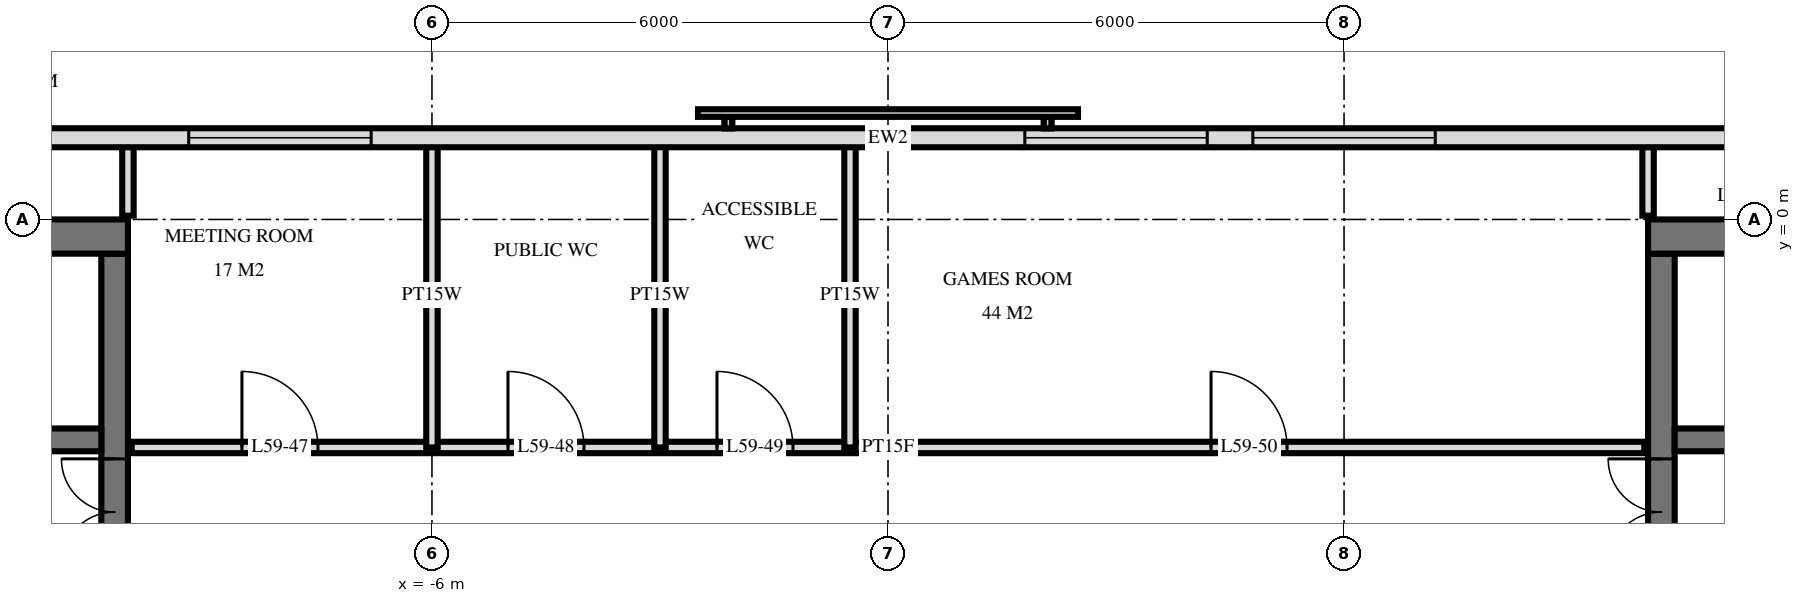
"""IFC4 building model, lengths in metres.
Left out: names, types, materials, properties, quantities, classifications, styles, units other than length and angle.
Written with IfcOpenShell. Run it as: python <this file> out.ifc"""

import sys

from ifc_helpers import new_model, si_unit, direction, frame, frame_2d, origin, place, context, subcontext, project, spatial, rectangle, extrude, element, fill, save


model = new_model("IFC4")
c1 = context("Model", 3, precision=1e-05, world=origin(), true_north=direction((0.0, 1.0)))
c2 = subcontext(c1, "Body", "Model", "MODEL_VIEW")
j1 = project(units=[si_unit("LENGTHUNIT", "METRE"), si_unit("PLANEANGLEUNIT", "RADIAN")], contexts=[c1])
p1 = place(None, origin())
s1 = spatial("IfcSite", under=j1, at=p1, CompositionType="ELEMENT")
p2 = place(p1, origin())
s2 = spatial("IfcBuilding", under=s1, at=p2, CompositionType="ELEMENT")
p3 = place(p2, frame((0.0, 0.0, 225.6)))
s3 = spatial("IfcBuildingStorey", under=s2, at=p3, CompositionType="ELEMENT", Elevation=225.6)
p4 = place(p3, frame((-24.5, -0.225, 0.0), z_axis=(0.0, 0.0, 1.0), x_axis=(1.0, 0.0, 0.0)))
e1 = element("IfcWall", 1, at=p4, inside=s3, PredefinedType="SHEAR", context=c2, shape_type="SweptSolid", body=[
    extrude(rectangle(XDim=14.5, YDim=0.45, at=frame_2d((7.25, 0.0))), origin(), (0.0, 0.0, 1.0), 3.5),
])
p5 = place(p3, frame((-10.175, -14.55, 0.0), z_axis=(0.0, 0.0, 1.0), x_axis=(0.0, 1.0, 0.0)))
e2 = element("IfcWall", 2, at=p5, inside=s3, PredefinedType="SHEAR", context=c2, shape_type="SweptSolid", body=[
    extrude(rectangle(XDim=14.1, YDim=0.35, at=frame_2d((7.05, 0.0))), origin(), (0.0, 0.0, 1.0), 3.5),
])
p6 = place(p5, frame((8.4, 0.0, 0.0)))
e3 = element("IfcOpeningElement", 3, at=p6, cuts=e2, PredefinedType="OPENING", context=c2, shape_type="SweptSolid", body=[
    extrude(rectangle(XDim=1.4, YDim=2.4, at=frame_2d((0.7, 1.2))), frame((0.0, 0.185, 0.0), z_axis=(0.0, -1.0, 0.0), x_axis=(1.0, 0.0, 0.0)), (0.0, 0.0, 1.0), 0.37),
])
p7 = place(p5, frame((10.0, 0.0, 0.0)))
e4 = element("IfcOpeningElement", 4, at=p7, cuts=e2, PredefinedType="OPENING", context=c2, shape_type="SweptSolid", body=[
    extrude(rectangle(XDim=1.4, YDim=2.4, at=frame_2d((0.7, 1.2))), frame((0.0, 0.185, 0.0), z_axis=(0.0, -1.0, 0.0), x_axis=(1.0, 0.0, 0.0)), (0.0, 0.0, 1.0), 0.37),
])
p8 = place(p5, frame((4.0, 0.0, 0.0)))
e5 = element("IfcOpeningElement", 5, at=p8, cuts=e2, PredefinedType="OPENING", context=c2, shape_type="SweptSolid", body=[
    extrude(rectangle(XDim=1.2, YDim=2.1, at=frame_2d((0.6, 1.05))), frame((0.0, 0.185, 0.0), z_axis=(0.0, -1.0, 0.0), x_axis=(1.0, 0.0, 0.0)), (0.0, 0.0, 1.0), 0.37),
])
p9 = place(p3, frame((-24.05, -2.9, 0.0), z_axis=(0.0, 0.0, 1.0), x_axis=(1.0, 0.0, 0.0)))
e6 = element("IfcWall", 6, at=p9, inside=s3, PredefinedType="SHEAR", context=c2, shape_type="SweptSolid", body=[
    extrude(rectangle(XDim=13.7, YDim=0.3, at=frame_2d((6.85, 0.0))), origin(), (0.0, 0.0, 1.0), 3.5),
])
p10 = place(p9, frame((0.55, 0.0, 0.0)))
e7 = element("IfcOpeningElement", 7, at=p10, cuts=e6, PredefinedType="OPENING", context=c2, shape_type="SweptSolid", body=[
    extrude(rectangle(XDim=1.1, YDim=2.1, at=frame_2d((0.55, 1.05))), frame((0.0, 0.16, 0.0), z_axis=(0.0, -1.0, 0.0), x_axis=(1.0, 0.0, 0.0)), (0.0, 0.0, 1.0), 0.32),
])
p11 = place(p9, frame((5.9, 0.0, 0.0)))
e8 = element("IfcOpeningElement", 8, at=p11, cuts=e6, PredefinedType="OPENING", context=c2, shape_type="SweptSolid", body=[
    extrude(rectangle(XDim=0.9, YDim=2.1, at=frame_2d((0.45, 1.05))), frame((0.0, 0.16, 0.0), z_axis=(0.0, -1.0, 0.0), x_axis=(1.0, 0.0, 0.0)), (0.0, 0.0, 1.0), 0.32),
])
p12 = place(p9, frame((11.85, 0.0, 0.0)))
e9 = element("IfcOpeningElement", 9, at=p12, cuts=e6, PredefinedType="OPENING", context=c2, shape_type="SweptSolid", body=[
    extrude(rectangle(XDim=1.0, YDim=2.1, at=frame_2d((0.5, 1.05))), frame((0.0, 0.16, 0.0), z_axis=(0.0, -1.0, 0.0), x_axis=(1.0, 0.0, 0.0)), (0.0, 0.0, 1.0), 0.32),
])
p13 = place(p9, frame((9.312, 0.0, 0.0)))
e10 = element("IfcOpeningElement", 10, at=p13, cuts=e6, PredefinedType="OPENING", context=c2, shape_type="SweptSolid", body=[
    extrude(rectangle(XDim=1.0, YDim=2.1, at=frame_2d((0.5, 1.05))), frame((0.0, 0.16, 0.0), z_axis=(0.0, -1.0, 0.0), x_axis=(1.0, 0.0, 0.0)), (0.0, 0.0, 1.0), 0.32),
])
p14 = place(p9, frame((7.887, 0.0, 0.0)))
e11 = element("IfcOpeningElement", 11, at=p14, cuts=e6, PredefinedType="OPENING", context=c2, shape_type="SweptSolid", body=[
    extrude(rectangle(XDim=1.0, YDim=2.1, at=frame_2d((0.5, 1.05))), frame((0.0, 0.16, 0.0), z_axis=(0.0, -1.0, 0.0), x_axis=(1.0, 0.0, 0.0)), (0.0, 0.0, 1.0), 0.32),
])
p15 = place(p9, frame((3.0, 0.0, 0.0)))
e12 = element("IfcOpeningElement", 12, at=p15, cuts=e6, PredefinedType="OPENING", context=c2, shape_type="SweptSolid", body=[
    extrude(rectangle(XDim=1.0, YDim=2.1, at=frame_2d((0.5, 1.05))), frame((0.0, 0.16, 0.0), z_axis=(0.0, -1.0, 0.0), x_axis=(1.0, 0.0, 0.0)), (0.0, 0.0, 1.0), 0.32),
])
p16 = place(p3, frame((10.0, -0.225, 0.0), z_axis=(0.0, 0.0, 1.0), x_axis=(1.0, 0.0, 0.0)))
e13 = element("IfcWall", 13, at=p16, inside=s3, PredefinedType="SHEAR", context=c2, shape_type="SweptSolid", body=[
    extrude(rectangle(XDim=14.5, YDim=0.45, at=frame_2d((7.25, 0.0))), origin(), (0.0, 0.0, 1.0), 3.5),
])
p17 = place(p3, frame((10.175, -14.55, 0.0), z_axis=(0.0, 0.0, 1.0), x_axis=(0.0, 1.0, 0.0)))
e14 = element("IfcWall", 14, at=p17, inside=s3, PredefinedType="SHEAR", context=c2, shape_type="SweptSolid", body=[
    extrude(rectangle(XDim=14.1, YDim=0.35, at=frame_2d((7.05, 0.0))), origin(), (0.0, 0.0, 1.0), 3.5),
])
p18 = place(p17, frame((8.4, 0.0, 0.0)))
e15 = element("IfcOpeningElement", 15, at=p18, cuts=e14, PredefinedType="OPENING", context=c2, shape_type="SweptSolid", body=[
    extrude(rectangle(XDim=1.4, YDim=2.4, at=frame_2d((0.7, 1.2))), frame((0.0, 0.185, 0.0), z_axis=(0.0, -1.0, 0.0), x_axis=(1.0, 0.0, 0.0)), (0.0, 0.0, 1.0), 0.37),
])
p19 = place(p17, frame((10.0, 0.0, 0.0)))
e16 = element("IfcOpeningElement", 16, at=p19, cuts=e14, PredefinedType="OPENING", context=c2, shape_type="SweptSolid", body=[
    extrude(rectangle(XDim=1.4, YDim=2.4, at=frame_2d((0.7, 1.2))), frame((0.0, 0.185, 0.0), z_axis=(0.0, -1.0, 0.0), x_axis=(1.0, 0.0, 0.0)), (0.0, 0.0, 1.0), 0.37),
])
p20 = place(p17, frame((4.0, 0.0, 0.0)))
e17 = element("IfcOpeningElement", 17, at=p20, cuts=e14, PredefinedType="OPENING", context=c2, shape_type="SweptSolid", body=[
    extrude(rectangle(XDim=1.2, YDim=2.1, at=frame_2d((0.6, 1.05))), frame((0.0, 0.185, 0.0), z_axis=(0.0, -1.0, 0.0), x_axis=(1.0, 0.0, 0.0)), (0.0, 0.0, 1.0), 0.37),
])
p21 = place(p3, frame((10.35, -2.9, 0.0), z_axis=(0.0, 0.0, 1.0), x_axis=(1.0, 0.0, 0.0)))
e18 = element("IfcWall", 18, at=p21, inside=s3, PredefinedType="SHEAR", context=c2, shape_type="SweptSolid", body=[
    extrude(rectangle(XDim=13.7, YDim=0.3, at=frame_2d((6.85, 0.0))), origin(), (0.0, 0.0, 1.0), 3.5),
])
p22 = place(p21, frame((12.05, 0.0, 0.0)))
e19 = element("IfcOpeningElement", 19, at=p22, cuts=e18, PredefinedType="OPENING", context=c2, shape_type="SweptSolid", body=[
    extrude(rectangle(XDim=1.1, YDim=2.1, at=frame_2d((0.55, 1.05))), frame((0.0, 0.16, 0.0), z_axis=(0.0, -1.0, 0.0), x_axis=(1.0, 0.0, 0.0)), (0.0, 0.0, 1.0), 0.32),
])
p23 = place(p21, frame((6.9, 0.0, 0.0)))
e20 = element("IfcOpeningElement", 20, at=p23, cuts=e18, PredefinedType="OPENING", context=c2, shape_type="SweptSolid", body=[
    extrude(rectangle(XDim=0.9, YDim=2.1, at=frame_2d((0.45, 1.05))), frame((0.0, 0.16, 0.0), z_axis=(0.0, -1.0, 0.0), x_axis=(1.0, 0.0, 0.0)), (0.0, 0.0, 1.0), 0.32),
])
p24 = place(p21, frame((0.85, 0.0, 0.0)))
e21 = element("IfcOpeningElement", 21, at=p24, cuts=e18, PredefinedType="OPENING", context=c2, shape_type="SweptSolid", body=[
    extrude(rectangle(XDim=1.0, YDim=2.1, at=frame_2d((0.5, 1.05))), frame((0.0, 0.16, 0.0), z_axis=(0.0, -1.0, 0.0), x_axis=(1.0, 0.0, 0.0)), (0.0, 0.0, 1.0), 0.32),
])
p25 = place(p21, frame((3.387, 0.0, 0.0)))
e22 = element("IfcOpeningElement", 22, at=p25, cuts=e18, PredefinedType="OPENING", context=c2, shape_type="SweptSolid", body=[
    extrude(rectangle(XDim=1.0, YDim=2.1, at=frame_2d((0.5, 1.05))), frame((0.0, 0.16, 0.0), z_axis=(0.0, -1.0, 0.0), x_axis=(1.0, 0.0, 0.0)), (0.0, 0.0, 1.0), 0.32),
])
p26 = place(p21, frame((4.812, 0.0, 0.0)))
e23 = element("IfcOpeningElement", 23, at=p26, cuts=e18, PredefinedType="OPENING", context=c2, shape_type="SweptSolid", body=[
    extrude(rectangle(XDim=1.0, YDim=2.1, at=frame_2d((0.5, 1.05))), frame((0.0, 0.16, 0.0), z_axis=(0.0, -1.0, 0.0), x_axis=(1.0, 0.0, 0.0)), (0.0, 0.0, 1.0), 0.32),
])
p27 = place(p21, frame((9.7, 0.0, 0.0)))
e24 = element("IfcOpeningElement", 24, at=p27, cuts=e18, PredefinedType="OPENING", context=c2, shape_type="SweptSolid", body=[
    extrude(rectangle(XDim=1.0, YDim=2.1, at=frame_2d((0.5, 1.05))), frame((0.0, 0.16, 0.0), z_axis=(0.0, -1.0, 0.0), x_axis=(1.0, 0.0, 0.0)), (0.0, 0.0, 1.0), 0.32),
])
p28 = place(p3, frame((22.475, 1.075, 0.0), z_axis=(0.0, 0.0, 1.0), x_axis=(-1.0, 0.0, 0.0)))
e25 = element("IfcWall", 25, at=p28, inside=s3, PredefinedType="SOLIDWALL", context=c2, shape_type="SweptSolid", body=[
    extrude(rectangle(XDim=44.951, YDim=0.25, at=frame_2d((22.475, 0.0))), origin(), (0.0, 0.0, 1.0), 3.22),
])
p29 = place(p28, frame((15.275, 0.0, 0.9)))
e26 = element("IfcOpeningElement", 26, at=p29, cuts=e25, PredefinedType="OPENING", context=c2, shape_type="SweptSolid", body=[
    extrude(rectangle(XDim=2.4, YDim=1.5, at=frame_2d((1.2, 0.75))), frame((0.0, 0.135, 0.0), z_axis=(0.0, -1.0, 0.0), x_axis=(1.0, 0.0, 0.0)), (0.0, 0.0, 1.0), 0.27),
])
p30 = place(p28, frame((18.275, 0.0, 0.9)))
e27 = element("IfcOpeningElement", 27, at=p30, cuts=e25, PredefinedType="OPENING", context=c2, shape_type="SweptSolid", body=[
    extrude(rectangle(XDim=2.4, YDim=1.5, at=frame_2d((1.2, 0.75))), frame((0.0, 0.135, 0.0), z_axis=(0.0, -1.0, 0.0), x_axis=(1.0, 0.0, 0.0)), (0.0, 0.0, 1.0), 0.27),
])
p31 = place(p28, frame((29.275, 0.0, 0.9)))
e28 = element("IfcOpeningElement", 28, at=p31, cuts=e25, PredefinedType="OPENING", context=c2, shape_type="SweptSolid", body=[
    extrude(rectangle(XDim=2.4, YDim=1.5, at=frame_2d((1.2, 0.75))), frame((0.0, 0.135, 0.0), z_axis=(0.0, -1.0, 0.0), x_axis=(1.0, 0.0, 0.0)), (0.0, 0.0, 1.0), 0.27),
])
p32 = place(p3, frame((10.0, 0.05, 0.0), z_axis=(0.0, 0.0, 1.0), x_axis=(0.0, 1.0, 0.0)))
e29 = element("IfcWall", 29, at=p32, inside=s3, PredefinedType="PARTITIONING", context=c2, shape_type="SweptSolid", body=[
    extrude(rectangle(XDim=0.97, YDim=0.15, at=frame_2d((0.485, 0.0))), origin(), (0.0, 0.0, 1.0), 3.22),
])
for number, where, z_axis, x_axis in (
    (30, (-0.5, -3.0, 0.0), (0.0, 0.0, 1.0), (0.0, 1.0, 0.0)),
    (31, (-3.0, -3.0, 0.0), (0.0, 0.0, 1.0), (0.0, 1.0, 0.0)),
    (32, (-6.0, -3.0, 0.0), (0.0, 0.0, 1.0), (0.0, 1.0, 0.0)),
):
    element("IfcWall", number, at=place(p3, frame(where, z_axis=z_axis, x_axis=x_axis)), inside=s3, PredefinedType="PLUMBINGWALL", context=c2, shape_type="SweptSolid", body=[
        extrude(rectangle(XDim=4.02, YDim=0.15, at=frame_2d((2.01, 0.0))), origin(), (0.0, 0.0, 1.0), 3.22),
    ])
p33 = place(p3, frame((-10.0, 0.05, 0.0), z_axis=(0.0, 0.0, 1.0), x_axis=(0.0, 1.0, 0.0)))
e33 = element("IfcWall", 33, at=p33, inside=s3, PredefinedType="PARTITIONING", context=c2, shape_type="SweptSolid", body=[
    extrude(rectangle(XDim=0.97, YDim=0.15, at=frame_2d((0.485, 0.0))), origin(), (0.0, 0.0, 1.0), 3.22),
])
p34 = place(p3, frame((-9.95, -3.0, 0.0), z_axis=(0.0, 0.0, 1.0), x_axis=(1.0, 0.0, 0.0)))
e34 = element("IfcWall", 34, at=p34, inside=s3, PredefinedType="PARTITIONING", context=c2, shape_type="SweptSolid", body=[
    extrude(rectangle(XDim=19.9, YDim=0.15, at=frame_2d((9.95, 0.0))), origin(), (0.0, 0.0, 1.0), 3.22),
])
p35 = place(p34, frame((1.45, 0.0, 0.0)))
e35 = element("IfcOpeningElement", 35, at=p35, cuts=e34, PredefinedType="OPENING", context=c2, shape_type="SweptSolid", body=[
    extrude(rectangle(XDim=1.0, YDim=2.1, at=frame_2d((0.5, 1.05))), frame((0.0, 0.085, 0.0), z_axis=(0.0, -1.0, 0.0), x_axis=(1.0, 0.0, 0.0)), (0.0, 0.0, 1.0), 0.17),
])
p36 = place(p34, frame((4.95, 0.0, 0.0)))
e36 = element("IfcOpeningElement", 36, at=p36, cuts=e34, PredefinedType="OPENING", context=c2, shape_type="SweptSolid", body=[
    extrude(rectangle(XDim=1.0, YDim=2.1, at=frame_2d((0.5, 1.05))), frame((0.0, 0.085, 0.0), z_axis=(0.0, -1.0, 0.0), x_axis=(1.0, 0.0, 0.0)), (0.0, 0.0, 1.0), 0.17),
])
p37 = place(p34, frame((7.7, 0.0, 0.0)))
e37 = element("IfcOpeningElement", 37, at=p37, cuts=e34, PredefinedType="OPENING", context=c2, shape_type="SweptSolid", body=[
    extrude(rectangle(XDim=1.0, YDim=2.1, at=frame_2d((0.5, 1.05))), frame((0.0, 0.085, 0.0), z_axis=(0.0, -1.0, 0.0), x_axis=(1.0, 0.0, 0.0)), (0.0, 0.0, 1.0), 0.17),
])
p38 = place(p34, frame((14.2, 0.0, 0.0)))
e38 = element("IfcOpeningElement", 38, at=p38, cuts=e34, PredefinedType="OPENING", context=c2, shape_type="SweptSolid", body=[
    extrude(rectangle(XDim=1.0, YDim=2.1, at=frame_2d((0.5, 1.05))), frame((0.0, 0.085, 0.0), z_axis=(0.0, -1.0, 0.0), x_axis=(1.0, 0.0, 0.0)), (0.0, 0.0, 1.0), 0.17),
])
p39 = place(p29, origin())
e39 = element("IfcWindow", 39, at=p39, inside=s3, PartitioningType="SINGLE_PANEL", PredefinedType="WINDOW", context=c2, shape_type="SweptSolid", body=[
    extrude(rectangle(XDim=2.4, YDim=1.5, at=frame_2d((1.2, 0.75))), frame((0.0, 0.03, 0.0), z_axis=(0.0, -1.0, 0.0), x_axis=(1.0, 0.0, 0.0)), (0.0, 0.0, 1.0), 0.06),
])
fill(e26, e39)
p40 = place(p30, origin())
e40 = element("IfcWindow", 40, at=p40, inside=s3, PartitioningType="SINGLE_PANEL", PredefinedType="WINDOW", context=c2, shape_type="SweptSolid", body=[
    extrude(rectangle(XDim=2.4, YDim=1.5, at=frame_2d((1.2, 0.75))), frame((0.0, 0.03, 0.0), z_axis=(0.0, -1.0, 0.0), x_axis=(1.0, 0.0, 0.0)), (0.0, 0.0, 1.0), 0.06),
])
fill(e27, e40)
p41 = place(p31, origin())
e41 = element("IfcWindow", 41, at=p41, inside=s3, PartitioningType="SINGLE_PANEL", PredefinedType="WINDOW", context=c2, shape_type="SweptSolid", body=[
    extrude(rectangle(XDim=2.4, YDim=1.5, at=frame_2d((1.2, 0.75))), frame((0.0, 0.03, 0.0), z_axis=(0.0, -1.0, 0.0), x_axis=(1.0, 0.0, 0.0)), (0.0, 0.0, 1.0), 0.06),
])
fill(e28, e41)
p42 = place(p7, origin())
e42 = element("IfcDoor", 42, at=p42, inside=s3, OperationType="DOUBLE_DOOR_SINGLE_SWING", PredefinedType="DOOR", context=c2, shape_type="SweptSolid", body=[
    extrude(rectangle(XDim=1.4, YDim=2.4, at=frame_2d((0.7, 1.2))), frame((0.0, 0.025, 0.0), z_axis=(0.0, -1.0, 0.0), x_axis=(1.0, 0.0, 0.0)), (0.0, 0.0, 1.0), 0.05),
])
fill(e4, e42)
p43 = place(p19, origin())
e43 = element("IfcDoor", 43, at=p43, inside=s3, OperationType="DOUBLE_DOOR_SINGLE_SWING", PredefinedType="DOOR", context=c2, shape_type="SweptSolid", body=[
    extrude(rectangle(XDim=1.4, YDim=2.4, at=frame_2d((0.7, 1.2))), frame((0.0, 0.025, 0.0), z_axis=(0.0, -1.0, 0.0), x_axis=(1.0, 0.0, 0.0)), (0.0, 0.0, 1.0), 0.05),
])
fill(e16, e43)
p44 = place(p35, origin())
e44 = element("IfcDoor", 44, at=p44, inside=s3, OperationType="SINGLE_SWING_RIGHT", PredefinedType="DOOR", context=c2, shape_type="SweptSolid", body=[
    extrude(rectangle(XDim=1.0, YDim=2.1, at=frame_2d((0.5, 1.05))), frame((0.0, 0.025, 0.0), z_axis=(0.0, -1.0, 0.0), x_axis=(1.0, 0.0, 0.0)), (0.0, 0.0, 1.0), 0.05),
])
fill(e35, e44)
p45 = place(p36, origin())
e45 = element("IfcDoor", 45, at=p45, inside=s3, OperationType="SINGLE_SWING_RIGHT", PredefinedType="DOOR", context=c2, shape_type="SweptSolid", body=[
    extrude(rectangle(XDim=1.0, YDim=2.1, at=frame_2d((0.5, 1.05))), frame((0.0, 0.025, 0.0), z_axis=(0.0, -1.0, 0.0), x_axis=(1.0, 0.0, 0.0)), (0.0, 0.0, 1.0), 0.05),
])
fill(e36, e45)
p46 = place(p37, origin())
e46 = element("IfcDoor", 46, at=p46, inside=s3, OperationType="SINGLE_SWING_RIGHT", PredefinedType="DOOR", context=c2, shape_type="SweptSolid", body=[
    extrude(rectangle(XDim=1.0, YDim=2.1, at=frame_2d((0.5, 1.05))), frame((0.0, 0.025, 0.0), z_axis=(0.0, -1.0, 0.0), x_axis=(1.0, 0.0, 0.0)), (0.0, 0.0, 1.0), 0.05),
])
fill(e37, e46)
p47 = place(p38, origin())
e47 = element("IfcDoor", 47, at=p47, inside=s3, OperationType="SINGLE_SWING_RIGHT", PredefinedType="DOOR", context=c2, shape_type="SweptSolid", body=[
    extrude(rectangle(XDim=1.0, YDim=2.1, at=frame_2d((0.5, 1.05))), frame((0.0, 0.025, 0.0), z_axis=(0.0, -1.0, 0.0), x_axis=(1.0, 0.0, 0.0)), (0.0, 0.0, 1.0), 0.05),
])
fill(e38, e47)
save(model, sys.argv[1])
